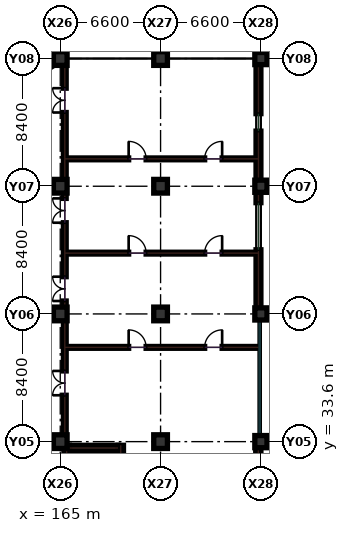
"""IFC4 building model, lengths in metres.
Left out: names, types, materials, properties, quantities, classifications, styles, units other than length and angle.
Written with IfcOpenShell. Run it as: python <this file> out.ifc"""

import sys

from ifc_helpers import new_model, si_unit, direction, frame, frame_2d, origin, origin_2d, place, context, subcontext, project, spatial, rectangle, extrude, element, fill, save


model = new_model("IFC4")
c1 = context("Model", 3, precision=1e-05, world=origin(), true_north=direction((0.0, 1.0)))
c2 = subcontext(c1, "Body", "Model", "MODEL_VIEW")
j1 = project(units=[si_unit("LENGTHUNIT", "METRE"), si_unit("PLANEANGLEUNIT", "RADIAN")], contexts=[c1])
p1 = place(None, origin())
s1 = spatial("IfcSite", under=j1, at=p1, CompositionType="ELEMENT")
p2 = place(p1, origin())
s2 = spatial("IfcBuilding", under=s1, at=p2, CompositionType="ELEMENT")
p3 = place(p2, frame((0.0, 0.0, 9.9)))
s3 = spatial("IfcBuildingStorey", under=s2, at=p3, CompositionType="ELEMENT", Elevation=9.9)
for number, where, z_axis, x_axis in (
    (1, (165.0, 33.6, 0.0), (0.0, 0.0, 1.0), (1.0, 0.0, 0.0)),
    (2, (165.0, 42.0, 0.0), (0.0, 0.0, 1.0), (1.0, 0.0, 0.0)),
    (3, (165.0, 50.4, 0.0), (0.0, 0.0, 1.0), (1.0, 0.0, 0.0)),
    (4, (165.0, 58.8, 0.0), (0.0, 0.0, 1.0), (1.0, 0.0, 0.0)),
    (5, (171.6, 33.6, 0.0), (0.0, 0.0, 1.0), (1.0, 0.0, 0.0)),
    (6, (171.6, 42.0, 0.0), (0.0, 0.0, 1.0), (1.0, 0.0, 0.0)),
    (7, (171.6, 50.4, 0.0), (0.0, 0.0, 1.0), (1.0, 0.0, 0.0)),
    (8, (171.6, 58.8, 0.0), (0.0, 0.0, 1.0), (1.0, 0.0, 0.0)),
):
    element("IfcColumn", number, at=place(p3, frame(where, z_axis=z_axis, x_axis=x_axis)), inside=s3, PredefinedType="COLUMN", context=c2, shape_type="SweptSolid", body=[
        extrude(rectangle(XDim=0.9, YDim=0.9, at=origin_2d()), origin(), (0.0, 0.0, 1.0), 4.5),
    ])
for number, where, z_axis, x_axis in (
    (9, (178.2, 33.6, 0.0), (0.0, 0.0, 1.0), (1.0, 0.0, 0.0)),
    (10, (178.2, 42.0, 0.0), (0.0, 0.0, 1.0), (1.0, 0.0, 0.0)),
    (11, (178.2, 50.4, 0.0), (0.0, 0.0, 1.0), (1.0, 0.0, 0.0)),
    (12, (178.2, 58.8, 0.0), (0.0, 0.0, 1.0), (1.0, 0.0, 0.0)),
):
    element("IfcColumn", number, at=place(p3, frame(where, z_axis=z_axis, x_axis=x_axis)), inside=s3, PredefinedType="COLUMN", context=c2, shape_type="SweptSolid", body=[
        extrude(rectangle(XDim=0.8, YDim=0.8, at=origin_2d()), origin(), (0.0, 0.0, 1.0), 4.5),
    ])
p4 = place(p3, frame((165.3, 33.65, 0.0), z_axis=(0.0, 0.0, 1.0), x_axis=(0.0, 1.0, 0.0)))
e13 = element("IfcWall", 13, at=p4, inside=s3, PredefinedType="SOLIDWALL", context=c2, shape_type="SweptSolid", body=[
    extrude(rectangle(XDim=7.9, YDim=0.18, at=frame_2d((3.95, 0.0))), origin(), (0.0, 0.0, 1.0), 3.49),
])
p5 = place(p4, frame((3.0, 0.0, 0.0)))
e14 = element("IfcOpeningElement", 14, at=p5, cuts=e13, PredefinedType="OPENING", context=c2, shape_type="SweptSolid", body=[
    extrude(rectangle(XDim=1.6, YDim=2.2, at=frame_2d((0.8, 1.1))), frame((0.0, 0.1, 0.0), z_axis=(0.0, -1.0, 0.0), x_axis=(1.0, 0.0, 0.0)), (0.0, 0.0, 1.0), 0.2),
])
p6 = place(p3, frame((165.3, 42.45, 0.0), z_axis=(0.0, 0.0, 1.0), x_axis=(0.0, 1.0, 0.0)))
e15 = element("IfcWall", 15, at=p6, inside=s3, PredefinedType="SOLIDWALL", context=c2, shape_type="SweptSolid", body=[
    extrude(rectangle(XDim=7.5, YDim=0.18, at=frame_2d((3.75, 0.0))), origin(), (0.0, 0.0, 1.0), 3.49),
])
p7 = place(p6, frame((0.4, 0.0, 0.0)))
e16 = element("IfcOpeningElement", 16, at=p7, cuts=e15, PredefinedType="OPENING", context=c2, shape_type="SweptSolid", body=[
    extrude(rectangle(XDim=1.6, YDim=2.2, at=frame_2d((0.8, 1.1))), frame((0.0, 0.1, 0.0), z_axis=(0.0, -1.0, 0.0), x_axis=(1.0, 0.0, 0.0)), (0.0, 0.0, 1.0), 0.2),
])
p8 = place(p6, frame((5.55, 0.0, 0.0)))
e17 = element("IfcOpeningElement", 17, at=p8, cuts=e15, PredefinedType="OPENING", context=c2, shape_type="SweptSolid", body=[
    extrude(rectangle(XDim=1.6, YDim=2.2, at=frame_2d((0.8, 1.1))), frame((0.0, 0.1, 0.0), z_axis=(0.0, -1.0, 0.0), x_axis=(1.0, 0.0, 0.0)), (0.0, 0.0, 1.0), 0.2),
])
p9 = place(p3, frame((165.3, 50.85, 0.0), z_axis=(0.0, 0.0, 1.0), x_axis=(0.0, 1.0, 0.0)))
e18 = element("IfcWall", 18, at=p9, inside=s3, PredefinedType="SOLIDWALL", context=c2, shape_type="SweptSolid", body=[
    extrude(rectangle(XDim=7.53, YDim=0.18, at=frame_2d((3.765, 0.0))), origin(), (0.0, 0.0, 1.0), 3.49),
])
p10 = place(p9, frame((4.4, 0.0, 0.0)))
e19 = element("IfcOpeningElement", 19, at=p10, cuts=e18, PredefinedType="OPENING", context=c2, shape_type="SweptSolid", body=[
    extrude(rectangle(XDim=1.6, YDim=2.2, at=frame_2d((0.8, 1.1))), frame((0.0, 0.1, 0.0), z_axis=(0.0, -1.0, 0.0), x_axis=(1.0, 0.0, 0.0)), (0.0, 0.0, 1.0), 0.2),
])
p11 = place(p3, frame((165.3, 39.8, 0.0), z_axis=(0.0, 0.0, 1.0), x_axis=(1.0, 0.0, 0.0)))
e20 = element("IfcWall", 20, at=p11, inside=s3, PredefinedType="PARTITIONING", context=c2, shape_type="SweptSolid", body=[
    extrude(rectangle(XDim=12.75, YDim=0.12, at=frame_2d((6.375, 0.0))), origin(), (0.0, 0.0, 1.0), 3.49),
])
p12 = place(p11, frame((4.2, 0.0, 0.0)))
e21 = element("IfcOpeningElement", 21, at=p12, cuts=e20, PredefinedType="OPENING", context=c2, shape_type="SweptSolid", body=[
    extrude(rectangle(XDim=1.15, YDim=2.2, at=frame_2d((0.575, 1.1))), frame((0.0, 0.07, 0.0), z_axis=(0.0, -1.0, 0.0), x_axis=(1.0, 0.0, 0.0)), (0.0, 0.0, 1.0), 0.14),
])
p13 = place(p11, frame((9.2, 0.0, 0.0)))
e22 = element("IfcOpeningElement", 22, at=p13, cuts=e20, PredefinedType="OPENING", context=c2, shape_type="SweptSolid", body=[
    extrude(rectangle(XDim=1.15, YDim=2.2, at=frame_2d((0.575, 1.1))), frame((0.0, 0.07, 0.0), z_axis=(0.0, -1.0, 0.0), x_axis=(1.0, 0.0, 0.0)), (0.0, 0.0, 1.0), 0.14),
])
p14 = place(p3, frame((165.3, 46.0, 0.0), z_axis=(0.0, 0.0, 1.0), x_axis=(1.0, 0.0, 0.0)))
e23 = element("IfcWall", 23, at=p14, inside=s3, PredefinedType="PARTITIONING", context=c2, shape_type="SweptSolid", body=[
    extrude(rectangle(XDim=12.75, YDim=0.12, at=frame_2d((6.375, 0.0))), origin(), (0.0, 0.0, 1.0), 3.49),
])
p15 = place(p14, frame((4.2, 0.0, 0.0)))
e24 = element("IfcOpeningElement", 24, at=p15, cuts=e23, PredefinedType="OPENING", context=c2, shape_type="SweptSolid", body=[
    extrude(rectangle(XDim=1.15, YDim=2.2, at=frame_2d((0.575, 1.1))), frame((0.0, 0.07, 0.0), z_axis=(0.0, -1.0, 0.0), x_axis=(1.0, 0.0, 0.0)), (0.0, 0.0, 1.0), 0.14),
])
p16 = place(p14, frame((9.2, 0.0, 0.0)))
e25 = element("IfcOpeningElement", 25, at=p16, cuts=e23, PredefinedType="OPENING", context=c2, shape_type="SweptSolid", body=[
    extrude(rectangle(XDim=1.15, YDim=2.2, at=frame_2d((0.575, 1.1))), frame((0.0, 0.07, 0.0), z_axis=(0.0, -1.0, 0.0), x_axis=(1.0, 0.0, 0.0)), (0.0, 0.0, 1.0), 0.14),
])
p17 = place(p3, frame((165.3, 52.2, 0.0), z_axis=(0.0, 0.0, 1.0), x_axis=(1.0, 0.0, 0.0)))
e26 = element("IfcWall", 26, at=p17, inside=s3, PredefinedType="PARTITIONING", context=c2, shape_type="SweptSolid", body=[
    extrude(rectangle(XDim=12.75, YDim=0.12, at=frame_2d((6.375, 0.0))), origin(), (0.0, 0.0, 1.0), 3.49),
])
p18 = place(p17, frame((4.2, 0.0, 0.0)))
e27 = element("IfcOpeningElement", 27, at=p18, cuts=e26, PredefinedType="OPENING", context=c2, shape_type="SweptSolid", body=[
    extrude(rectangle(XDim=1.15, YDim=2.2, at=frame_2d((0.575, 1.1))), frame((0.0, 0.07, 0.0), z_axis=(0.0, -1.0, 0.0), x_axis=(1.0, 0.0, 0.0)), (0.0, 0.0, 1.0), 0.14),
])
p19 = place(p17, frame((9.2, 0.0, 0.0)))
e28 = element("IfcOpeningElement", 28, at=p19, cuts=e26, PredefinedType="OPENING", context=c2, shape_type="SweptSolid", body=[
    extrude(rectangle(XDim=1.15, YDim=2.2, at=frame_2d((0.575, 1.1))), frame((0.0, 0.07, 0.0), z_axis=(0.0, -1.0, 0.0), x_axis=(1.0, 0.0, 0.0)), (0.0, 0.0, 1.0), 0.14),
])
p20 = place(p3, frame((178.03, 25.595, 0.0), z_axis=(0.0, 0.0, 1.0), x_axis=(0.0, 1.0, 0.0)))
e29 = element("IfcWall", 29, at=p20, inside=s3, PredefinedType="SHEAR", context=c2, shape_type="SweptSolid", body=[
    extrude(rectangle(XDim=7.61, YDim=0.34, at=frame_2d((3.805, 0.0))), origin(), (0.0, 0.0, 1.0), 4.24),
])
p21 = place(p3, frame((178.04, 42.395, 0.0), z_axis=(0.0, 0.0, 1.0), x_axis=(0.0, 1.0, 0.0)))
e30 = element("IfcWall", 30, at=p21, inside=s3, PredefinedType="SOLIDWALL", context=c2, shape_type="SweptSolid", body=[
    extrude(rectangle(XDim=7.61, YDim=0.32, at=frame_2d((3.805, 0.0))), origin(), (0.0, 0.0, 1.0), 3.625),
])
p22 = place(p21, frame((3.825, 0.0, 0.95)))
e31 = element("IfcOpeningElement", 31, at=p22, cuts=e30, PredefinedType="OPENING", context=c2, shape_type="SweptSolid", body=[
    extrude(rectangle(XDim=3.1, YDim=2.05, at=frame_2d((1.55, 1.025))), frame((0.0, 0.17, 0.0), z_axis=(0.0, -1.0, 0.0), x_axis=(1.0, 0.0, 0.0)), (0.0, 0.0, 1.0), 0.34),
])
p23 = place(p3, frame((178.04, 50.795, 0.0), z_axis=(0.0, 0.0, 1.0), x_axis=(0.0, 1.0, 0.0)))
e32 = element("IfcWall", 32, at=p23, inside=s3, PredefinedType="SOLIDWALL", context=c2, shape_type="SweptSolid", body=[
    extrude(rectangle(XDim=7.61, YDim=0.32, at=frame_2d((3.805, 0.0))), origin(), (0.0, 0.0, 1.0), 3.625),
])
p24 = place(p23, frame((3.23, 0.0, 0.95)))
e33 = element("IfcOpeningElement", 33, at=p24, cuts=e32, PredefinedType="OPENING", context=c2, shape_type="SweptSolid", body=[
    extrude(rectangle(XDim=1.15, YDim=1.6, at=frame_2d((0.575, 0.8))), frame((0.0, 0.17, 0.0), z_axis=(0.0, -1.0, 0.0), x_axis=(1.0, 0.0, 0.0)), (0.0, 0.0, 1.0), 0.34),
])
p25 = place(p3, frame((178.04, 59.195, 0.0), z_axis=(0.0, 0.0, 1.0), x_axis=(0.0, 1.0, 0.0)))
e34 = element("IfcWall", 34, at=p25, inside=s3, PredefinedType="SOLIDWALL", context=c2, shape_type="SweptSolid", body=[
    extrude(rectangle(XDim=7.76, YDim=0.32, at=frame_2d((3.88, 0.0))), origin(), (0.0, 0.0, 1.0), 3.625),
])
p26 = place(p25, frame((0.65, 0.0, 0.95)))
e35 = element("IfcOpeningElement", 35, at=p26, cuts=e34, PredefinedType="OPENING", context=c2, shape_type="SweptSolid", body=[
    extrude(rectangle(XDim=1.2, YDim=1.5, at=frame_2d((0.6, 0.75))), frame((0.0, 0.17, 0.0), z_axis=(0.0, -1.0, 0.0), x_axis=(1.0, 0.0, 0.0)), (0.0, 0.0, 1.0), 0.34),
])
p27 = place(p25, frame((5.91, 0.0, 0.95)))
e36 = element("IfcOpeningElement", 36, at=p27, cuts=e34, PredefinedType="OPENING", context=c2, shape_type="SweptSolid", body=[
    extrude(rectangle(XDim=1.2, YDim=1.5, at=frame_2d((0.6, 0.75))), frame((0.0, 0.17, 0.0), z_axis=(0.0, -1.0, 0.0), x_axis=(1.0, 0.0, 0.0)), (0.0, 0.0, 1.0), 0.34),
])
p28 = place(p3, frame((158.65, 54.76, 0.0), z_axis=(0.0, 0.0, 1.0), x_axis=(0.843786613851, 0.536678814829, 0.0)))
e37 = element("IfcWall", 37, at=p28, inside=s3, PredefinedType="SOLIDWALL", context=c2, shape_type="SweptSolid", body=[
    extrude(rectangle(XDim=7.229, YDim=0.32, at=frame_2d((3.615, 0.0))), origin(), (0.0, 0.0, 1.0), 3.625),
])
p29 = place(p28, frame((2.415, 0.0, 0.95)))
e38 = element("IfcOpeningElement", 38, at=p29, cuts=e37, PredefinedType="OPENING", context=c2, shape_type="SweptSolid", body=[
    extrude(rectangle(XDim=2.4, YDim=1.6, at=frame_2d((1.2, 0.8))), frame((0.0, 0.17, 0.0), z_axis=(0.0, -1.0, 0.0), x_axis=(1.0, 0.0, 0.0)), (0.0, 0.0, 1.0), 0.34),
])
p30 = place(p3, frame((165.42, 25.19, 0.0), z_axis=(0.0, 0.0, 1.0), x_axis=(0.0, 1.0, 0.0)))
e39 = element("IfcWall", 39, at=p30, inside=s3, PredefinedType="SHEAR", context=c2, shape_type="SweptSolid", body=[
    extrude(rectangle(XDim=8.17, YDim=0.36, at=frame_2d((4.085, 0.0))), origin(), (0.0, 0.0, 1.0), 4.24),
])
p31 = place(p3, frame((168.98, 25.19, 0.0), z_axis=(0.0, 0.0, 1.0), x_axis=(0.0, 1.0, 0.0)))
e40 = element("IfcWall", 40, at=p31, inside=s3, PredefinedType="SHEAR", context=c2, shape_type="SweptSolid", body=[
    extrude(rectangle(XDim=8.17, YDim=0.36, at=frame_2d((4.085, 0.0))), origin(), (0.0, 0.0, 1.0), 4.24),
])
p32 = place(p31, frame((0.45, 0.0, 0.0)))
e41 = element("IfcOpeningElement", 41, at=p32, cuts=e40, PredefinedType="OPENING", context=c2, shape_type="SweptSolid", body=[
    extrude(rectangle(XDim=1.25, YDim=2.15, at=frame_2d((0.625, 1.075))), frame((0.0, 0.19, 0.0), z_axis=(0.0, -1.0, 0.0), x_axis=(1.0, 0.0, 0.0)), (0.0, 0.0, 1.0), 0.38),
])
p33 = place(p3, frame((165.6, 33.18, 0.0), z_axis=(0.0, 0.0, 1.0), x_axis=(1.0, 0.0, 0.0)))
e42 = element("IfcWall", 42, at=p33, inside=s3, PredefinedType="SHEAR", context=c2, shape_type="SweptSolid", body=[
    extrude(rectangle(XDim=3.2, YDim=0.36, at=frame_2d((1.6, 0.0))), origin(), (0.0, 0.0, 1.0), 4.24),
])
p34 = place(p5, origin())
e43 = element("IfcDoor", 43, at=p34, inside=s3, OperationType="DOUBLE_DOOR_SINGLE_SWING", PredefinedType="DOOR", context=c2, shape_type="SweptSolid", body=[
    extrude(rectangle(XDim=1.6, YDim=2.2, at=frame_2d((0.8, 1.1))), frame((0.0, 0.025, 0.0), z_axis=(0.0, -1.0, 0.0), x_axis=(1.0, 0.0, 0.0)), (0.0, 0.0, 1.0), 0.05),
])
fill(e14, e43)
p35 = place(p7, origin())
e44 = element("IfcDoor", 44, at=p35, inside=s3, OperationType="DOUBLE_DOOR_SINGLE_SWING", PredefinedType="DOOR", context=c2, shape_type="SweptSolid", body=[
    extrude(rectangle(XDim=1.6, YDim=2.2, at=frame_2d((0.8, 1.1))), frame((0.0, 0.025, 0.0), z_axis=(0.0, -1.0, 0.0), x_axis=(1.0, 0.0, 0.0)), (0.0, 0.0, 1.0), 0.05),
])
fill(e16, e44)
p36 = place(p8, origin())
e45 = element("IfcDoor", 45, at=p36, inside=s3, OperationType="DOUBLE_DOOR_SINGLE_SWING", PredefinedType="DOOR", context=c2, shape_type="SweptSolid", body=[
    extrude(rectangle(XDim=1.6, YDim=2.2, at=frame_2d((0.8, 1.1))), frame((0.0, 0.025, 0.0), z_axis=(0.0, -1.0, 0.0), x_axis=(1.0, 0.0, 0.0)), (0.0, 0.0, 1.0), 0.05),
])
fill(e17, e45)
p37 = place(p10, origin())
e46 = element("IfcDoor", 46, at=p37, inside=s3, OperationType="DOUBLE_DOOR_SINGLE_SWING", PredefinedType="DOOR", context=c2, shape_type="SweptSolid", body=[
    extrude(rectangle(XDim=1.6, YDim=2.2, at=frame_2d((0.8, 1.1))), frame((0.0, 0.025, 0.0), z_axis=(0.0, -1.0, 0.0), x_axis=(1.0, 0.0, 0.0)), (0.0, 0.0, 1.0), 0.05),
])
fill(e19, e46)
p38 = place(p12, origin())
e47 = element("IfcDoor", 47, at=p38, inside=s3, OperationType="SINGLE_SWING_LEFT", PredefinedType="DOOR", context=c2, shape_type="SweptSolid", body=[
    extrude(rectangle(XDim=1.15, YDim=2.2, at=frame_2d((0.575, 1.1))), frame((0.0, 0.025, 0.0), z_axis=(0.0, -1.0, 0.0), x_axis=(1.0, 0.0, 0.0)), (0.0, 0.0, 1.0), 0.05),
])
fill(e21, e47)
p39 = place(p13, origin())
e48 = element("IfcDoor", 48, at=p39, inside=s3, OperationType="SINGLE_SWING_RIGHT", PredefinedType="DOOR", context=c2, shape_type="SweptSolid", body=[
    extrude(rectangle(XDim=1.15, YDim=2.2, at=frame_2d((0.575, 1.1))), frame((0.0, 0.025, 0.0), z_axis=(0.0, -1.0, 0.0), x_axis=(1.0, 0.0, 0.0)), (0.0, 0.0, 1.0), 0.05),
])
fill(e22, e48)
p40 = place(p15, origin())
e49 = element("IfcDoor", 49, at=p40, inside=s3, OperationType="SINGLE_SWING_LEFT", PredefinedType="DOOR", context=c2, shape_type="SweptSolid", body=[
    extrude(rectangle(XDim=1.15, YDim=2.2, at=frame_2d((0.575, 1.1))), frame((0.0, 0.025, 0.0), z_axis=(0.0, -1.0, 0.0), x_axis=(1.0, 0.0, 0.0)), (0.0, 0.0, 1.0), 0.05),
])
fill(e24, e49)
p41 = place(p16, origin())
e50 = element("IfcDoor", 50, at=p41, inside=s3, OperationType="SINGLE_SWING_RIGHT", PredefinedType="DOOR", context=c2, shape_type="SweptSolid", body=[
    extrude(rectangle(XDim=1.15, YDim=2.2, at=frame_2d((0.575, 1.1))), frame((0.0, 0.025, 0.0), z_axis=(0.0, -1.0, 0.0), x_axis=(1.0, 0.0, 0.0)), (0.0, 0.0, 1.0), 0.05),
])
fill(e25, e50)
p42 = place(p18, origin())
e51 = element("IfcDoor", 51, at=p42, inside=s3, OperationType="SINGLE_SWING_LEFT", PredefinedType="DOOR", context=c2, shape_type="SweptSolid", body=[
    extrude(rectangle(XDim=1.15, YDim=2.2, at=frame_2d((0.575, 1.1))), frame((0.0, 0.025, 0.0), z_axis=(0.0, -1.0, 0.0), x_axis=(1.0, 0.0, 0.0)), (0.0, 0.0, 1.0), 0.05),
])
fill(e27, e51)
p43 = place(p19, origin())
e52 = element("IfcDoor", 52, at=p43, inside=s3, OperationType="SINGLE_SWING_RIGHT", PredefinedType="DOOR", context=c2, shape_type="SweptSolid", body=[
    extrude(rectangle(XDim=1.15, YDim=2.2, at=frame_2d((0.575, 1.1))), frame((0.0, 0.025, 0.0), z_axis=(0.0, -1.0, 0.0), x_axis=(1.0, 0.0, 0.0)), (0.0, 0.0, 1.0), 0.05),
])
fill(e28, e52)
p44 = place(p22, origin())
e53 = element("IfcWindow", 53, at=p44, inside=s3, PartitioningType="SINGLE_PANEL", PredefinedType="WINDOW", context=c2, shape_type="SweptSolid", body=[
    extrude(rectangle(XDim=3.1, YDim=2.05, at=frame_2d((1.55, 1.025))), frame((0.0, 0.03, 0.0), z_axis=(0.0, -1.0, 0.0), x_axis=(1.0, 0.0, 0.0)), (0.0, 0.0, 1.0), 0.06),
])
fill(e31, e53)
p45 = place(p24, origin())
e54 = element("IfcWindow", 54, at=p45, inside=s3, PartitioningType="SINGLE_PANEL", PredefinedType="WINDOW", context=c2, shape_type="SweptSolid", body=[
    extrude(rectangle(XDim=1.15, YDim=1.6, at=frame_2d((0.575, 0.8))), frame((0.0, 0.03, 0.0), z_axis=(0.0, -1.0, 0.0), x_axis=(1.0, 0.0, 0.0)), (0.0, 0.0, 1.0), 0.06),
])
fill(e33, e54)
save(model, sys.argv[1])
